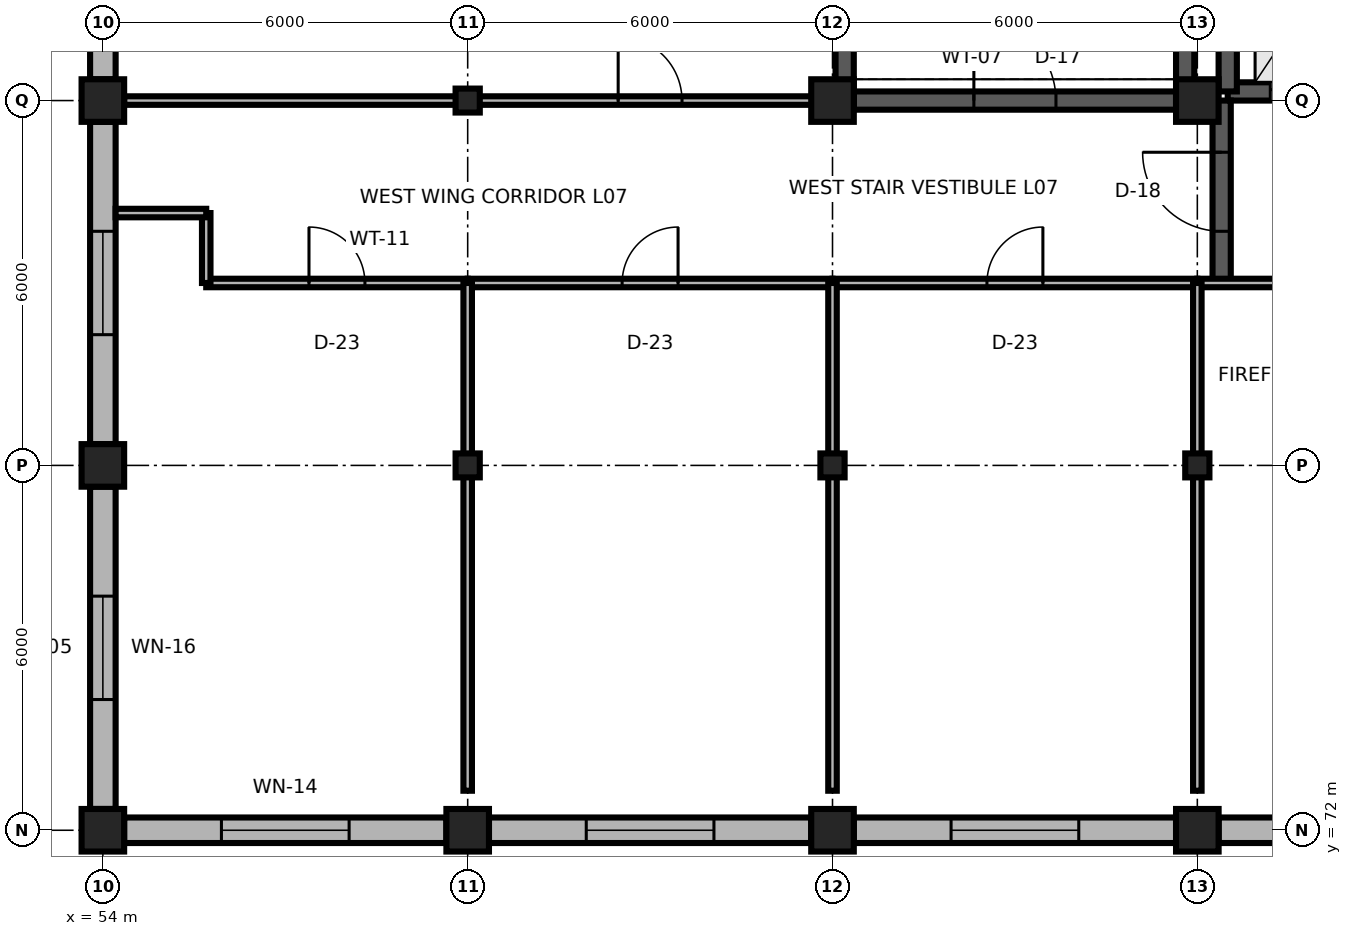
"""IFC4 building model, lengths in metres.
Left out: names, types, materials, properties, quantities, classifications, styles, units other than length and angle.
Written with IfcOpenShell. Run it as: python <this file> out.ifc"""

import sys

from ifc_helpers import new_model, si_unit, direction, frame, frame_2d, origin, origin_2d, place, context, subcontext, project, spatial, rectangle, i_section, extrude, element, fill, save


model = new_model("IFC4")
c1 = context("Model", 3, precision=1e-05, world=origin(), true_north=direction((0.0, 1.0)))
c2 = subcontext(c1, "Body", "Model", "MODEL_VIEW")
j1 = project(units=[si_unit("LENGTHUNIT", "METRE"), si_unit("PLANEANGLEUNIT", "RADIAN")], contexts=[c1])
p1 = place(None, origin())
s1 = spatial("IfcSite", under=j1, at=p1, CompositionType="ELEMENT")
p2 = place(p1, origin())
s2 = spatial("IfcBuilding", under=s1, at=p2, CompositionType="ELEMENT")
p3 = place(p2, frame((0.0, 0.0, 28.8)))
s3 = spatial("IfcBuildingStorey", under=s2, at=p3, CompositionType="ELEMENT", Elevation=28.8)
for number, where, z_axis, x_axis in (
    (1, (54.0, 72.0, 0.0), (0.0, 0.0, 1.0), (1.0, 0.0, 0.0)),
    (2, (60.0, 72.0, 0.0), (0.0, 0.0, 1.0), (1.0, 0.0, 0.0)),
    (3, (66.0, 72.0, 0.0), (0.0, 0.0, 1.0), (1.0, 0.0, 0.0)),
    (4, (72.0, 72.0, 0.0), (0.0, 0.0, 1.0), (1.0, 0.0, 0.0)),
    (5, (54.0, 78.0, 0.0), (0.0, 0.0, 1.0), (1.0, 0.0, 0.0)),
):
    element("IfcColumn", number, at=place(p3, frame(where, z_axis=z_axis, x_axis=x_axis)), inside=s3, PredefinedType="COLUMN", context=c2, shape_type="SweptSolid", body=[
        extrude(rectangle(XDim=0.7, YDim=0.7, at=origin_2d()), origin(), (0.0, 0.0, 1.0), 3.9),
    ])
for number, where, z_axis, x_axis in (
    (6, (60.0, 78.0, 0.0), (0.0, 0.0, 1.0), (1.0, 0.0, 0.0)),
    (7, (66.0, 78.0, 0.0), (0.0, 0.0, 1.0), (1.0, 0.0, 0.0)),
    (8, (72.0, 78.0, 0.0), (0.0, 0.0, 1.0), (1.0, 0.0, 0.0)),
):
    element("IfcColumn", number, at=place(p3, frame(where, z_axis=z_axis, x_axis=x_axis)), inside=s3, PredefinedType="COLUMN", context=c2, shape_type="SweptSolid", body=[
        extrude(i_section(OverallWidth=0.398, OverallDepth=0.394, WebThickness=0.011, FlangeThickness=0.018, FilletRadius=0.022, at=origin_2d()), origin(), (0.0, 0.0, 1.0), 3.9),
    ])
p4 = place(p3, frame((54.0, 84.0, 0.0), z_axis=(0.0, 0.0, 1.0), x_axis=(1.0, 0.0, 0.0)))
e9 = element("IfcColumn", 9, at=p4, inside=s3, PredefinedType="COLUMN", context=c2, shape_type="SweptSolid", body=[
    extrude(rectangle(XDim=0.7, YDim=0.7, at=origin_2d()), origin(), (0.0, 0.0, 1.0), 3.9),
])
p5 = place(p3, frame((60.0, 84.0, 0.0), z_axis=(0.0, 0.0, 1.0), x_axis=(1.0, 0.0, 0.0)))
e10 = element("IfcColumn", 10, at=p5, inside=s3, PredefinedType="COLUMN", context=c2, shape_type="SweptSolid", body=[
    extrude(i_section(OverallWidth=0.398, OverallDepth=0.394, WebThickness=0.011, FlangeThickness=0.018, FilletRadius=0.022, at=origin_2d()), origin(), (0.0, 0.0, 1.0), 3.9),
])
for number, where, z_axis, x_axis in (
    (11, (66.0, 84.0, 0.0), (0.0, 0.0, 1.0), (1.0, 0.0, 0.0)),
    (12, (72.0, 84.0, 0.0), (0.0, 0.0, 1.0), (1.0, 0.0, 0.0)),
):
    element("IfcColumn", number, at=place(p3, frame(where, z_axis=z_axis, x_axis=x_axis)), inside=s3, PredefinedType="COLUMN", context=c2, shape_type="SweptSolid", body=[
        extrude(rectangle(XDim=0.7, YDim=0.7, at=origin_2d()), origin(), (0.0, 0.0, 1.0), 3.9),
    ])
p6 = place(p3, frame((54.35, 72.0, 0.0), z_axis=(0.0, 0.0, 1.0), x_axis=(1.0, 0.0, 0.0)))
e13 = element("IfcWall", 13, at=p6, inside=s3, PredefinedType="SOLIDWALL", context=c2, shape_type="SweptSolid", body=[
    extrude(rectangle(XDim=5.3, YDim=0.42, at=frame_2d((2.65, 0.0))), origin(), (0.0, 0.0, 1.0), 3.32),
])
p7 = place(p6, frame((1.6, 0.0, 0.85)))
e14 = element("IfcOpeningElement", 14, at=p7, cuts=e13, PredefinedType="OPENING", context=c2, shape_type="SweptSolid", body=[
    extrude(rectangle(XDim=2.1, YDim=2.1, at=frame_2d((1.05, 1.05))), frame((0.0, 0.225, 0.0), z_axis=(0.0, -1.0, 0.0), x_axis=(1.0, 0.0, 0.0)), (0.0, 0.0, 1.0), 0.45),
])
p8 = place(p3, frame((60.35, 72.0, 0.0), z_axis=(0.0, 0.0, 1.0), x_axis=(1.0, 0.0, 0.0)))
e15 = element("IfcWall", 15, at=p8, inside=s3, PredefinedType="SOLIDWALL", context=c2, shape_type="SweptSolid", body=[
    extrude(rectangle(XDim=5.3, YDim=0.42, at=frame_2d((2.65, 0.0))), origin(), (0.0, 0.0, 1.0), 3.32),
])
p9 = place(p8, frame((1.6, 0.0, 0.85)))
e16 = element("IfcOpeningElement", 16, at=p9, cuts=e15, PredefinedType="OPENING", context=c2, shape_type="SweptSolid", body=[
    extrude(rectangle(XDim=2.1, YDim=2.1, at=frame_2d((1.05, 1.05))), frame((0.0, 0.225, 0.0), z_axis=(0.0, -1.0, 0.0), x_axis=(1.0, 0.0, 0.0)), (0.0, 0.0, 1.0), 0.45),
])
p10 = place(p3, frame((66.35, 72.0, 0.0), z_axis=(0.0, 0.0, 1.0), x_axis=(1.0, 0.0, 0.0)))
e17 = element("IfcWall", 17, at=p10, inside=s3, PredefinedType="SOLIDWALL", context=c2, shape_type="SweptSolid", body=[
    extrude(rectangle(XDim=5.3, YDim=0.42, at=frame_2d((2.65, 0.0))), origin(), (0.0, 0.0, 1.0), 3.32),
])
p11 = place(p10, frame((1.6, 0.0, 0.85)))
e18 = element("IfcOpeningElement", 18, at=p11, cuts=e17, PredefinedType="OPENING", context=c2, shape_type="SweptSolid", body=[
    extrude(rectangle(XDim=2.1, YDim=2.1, at=frame_2d((1.05, 1.05))), frame((0.0, 0.225, 0.0), z_axis=(0.0, -1.0, 0.0), x_axis=(1.0, 0.0, 0.0)), (0.0, 0.0, 1.0), 0.45),
])
p12 = place(p3, frame((72.35, 72.0, 0.0), z_axis=(0.0, 0.0, 1.0), x_axis=(1.0, 0.0, 0.0)))
e19 = element("IfcWall", 19, at=p12, inside=s3, PredefinedType="SOLIDWALL", context=c2, shape_type="SweptSolid", body=[
    extrude(rectangle(XDim=5.3, YDim=0.42, at=frame_2d((2.65, 0.0))), origin(), (0.0, 0.0, 1.0), 3.32),
])
p13 = place(p12, frame((1.6, 0.0, 0.85)))
e20 = element("IfcOpeningElement", 20, at=p13, cuts=e19, PredefinedType="OPENING", context=c2, shape_type="SweptSolid", body=[
    extrude(rectangle(XDim=2.1, YDim=2.1, at=frame_2d((1.05, 1.05))), frame((0.0, 0.225, 0.0), z_axis=(0.0, -1.0, 0.0), x_axis=(1.0, 0.0, 0.0)), (0.0, 0.0, 1.0), 0.45),
])
p14 = place(p3, frame((54.0, 72.35, 0.0), z_axis=(0.0, 0.0, 1.0), x_axis=(0.0, 1.0, 0.0)))
e21 = element("IfcWall", 21, at=p14, inside=s3, PredefinedType="SOLIDWALL", context=c2, shape_type="SweptSolid", body=[
    extrude(rectangle(XDim=5.3, YDim=0.42, at=frame_2d((2.65, 0.0))), origin(), (0.0, 0.0, 1.0), 3.32),
])
p15 = place(p14, frame((1.8, 0.0, 0.85)))
e22 = element("IfcOpeningElement", 22, at=p15, cuts=e21, PredefinedType="OPENING", context=c2, shape_type="SweptSolid", body=[
    extrude(rectangle(XDim=1.7, YDim=2.05, at=frame_2d((0.85, 1.025))), frame((0.0, 0.225, 0.0), z_axis=(0.0, -1.0, 0.0), x_axis=(1.0, 0.0, 0.0)), (0.0, 0.0, 1.0), 0.45),
])
p16 = place(p3, frame((54.0, 78.35, 0.0), z_axis=(0.0, 0.0, 1.0), x_axis=(0.0, 1.0, 0.0)))
e23 = element("IfcWall", 23, at=p16, inside=s3, PredefinedType="SOLIDWALL", context=c2, shape_type="SweptSolid", body=[
    extrude(rectangle(XDim=5.3, YDim=0.42, at=frame_2d((2.65, 0.0))), origin(), (0.0, 0.0, 1.0), 3.32),
])
p17 = place(p16, frame((1.8, 0.0, 0.85)))
e24 = element("IfcOpeningElement", 24, at=p17, cuts=e23, PredefinedType="OPENING", context=c2, shape_type="SweptSolid", body=[
    extrude(rectangle(XDim=1.7, YDim=2.05, at=frame_2d((0.85, 1.025))), frame((0.0, 0.225, 0.0), z_axis=(0.0, -1.0, 0.0), x_axis=(1.0, 0.0, 0.0)), (0.0, 0.0, 1.0), 0.45),
])
p18 = place(p3, frame((54.0, 84.35, 0.0), z_axis=(0.0, 0.0, 1.0), x_axis=(0.0, 1.0, 0.0)))
e25 = element("IfcWall", 25, at=p18, inside=s3, PredefinedType="SOLIDWALL", context=c2, shape_type="SweptSolid", body=[
    extrude(rectangle(XDim=5.3, YDim=0.42, at=frame_2d((2.65, 0.0))), origin(), (0.0, 0.0, 1.0), 3.32),
])
p19 = place(p18, frame((1.8, 0.0, 0.85)))
e26 = element("IfcOpeningElement", 26, at=p19, cuts=e25, PredefinedType="OPENING", context=c2, shape_type="SweptSolid", body=[
    extrude(rectangle(XDim=1.7, YDim=2.05, at=frame_2d((0.85, 1.025))), frame((0.0, 0.225, 0.0), z_axis=(0.0, -1.0, 0.0), x_axis=(1.0, 0.0, 0.0)), (0.0, 0.0, 1.0), 0.45),
])
p20 = place(p3, frame((66.35, 84.0, 0.0), z_axis=(0.0, 0.0, 1.0), x_axis=(1.0, 0.0, 0.0)))
e27 = element("IfcWall", 27, at=p20, inside=s3, PredefinedType="SHEAR", context=c2, shape_type="SweptSolid", body=[
    extrude(rectangle(XDim=5.3, YDim=0.3, at=frame_2d((2.65, 0.0))), origin(), (0.0, 0.0, 1.0), 3.66),
])
p21 = place(p20, frame((1.975, 0.0, 0.0)))
e28 = element("IfcOpeningElement", 28, at=p21, cuts=e27, PredefinedType="OPENING", context=c2, shape_type="SweptSolid", body=[
    extrude(rectangle(XDim=1.35, YDim=2.2, at=frame_2d((0.675, 1.1))), frame((0.0, 0.165, 0.0), z_axis=(0.0, -1.0, 0.0), x_axis=(1.0, 0.0, 0.0)), (0.0, 0.0, 1.0), 0.33),
])
for number, where, z_axis, x_axis in (
    (29, (66.2, 84.0, 0.0), (0.0, 0.0, 1.0), (0.0, 1.0, 0.0)),
    (30, (71.8, 84.0, 0.0), (0.0, 0.0, 1.0), (0.0, 1.0, 0.0)),
):
    element("IfcWall", number, at=place(p3, frame(where, z_axis=z_axis, x_axis=x_axis)), inside=s3, PredefinedType="SHEAR", context=c2, shape_type="SweptSolid", body=[
        extrude(rectangle(XDim=11.8, YDim=0.3, at=frame_2d((5.9, 0.0))), origin(), (0.0, 0.0, 1.0), 3.74),
    ])
p22 = place(p3, frame((72.5, 84.15, 0.0), z_axis=(0.0, 0.0, 1.0), x_axis=(1.0, 0.0, 0.0)))
e31 = element("IfcWall", 31, at=p22, inside=s3, PredefinedType="SHEAR", context=c2, shape_type="SweptSolid", body=[
    extrude(rectangle(XDim=2.5, YDim=0.3, at=frame_2d((1.25, 0.0))), origin(), (0.0, 0.0, 1.0), 3.74),
])
p23 = place(p22, frame((0.7, 0.0, 0.0)))
e32 = element("IfcOpeningElement", 32, at=p23, cuts=e31, PredefinedType="OPENING", context=c2, shape_type="SweptSolid", body=[
    extrude(rectangle(XDim=1.1, YDim=2.1, at=frame_2d((0.55, 1.05))), frame((0.0, 0.165, 0.0), z_axis=(0.0, -1.0, 0.0), x_axis=(1.0, 0.0, 0.0)), (0.0, 0.0, 1.0), 0.33),
])
p24 = place(p3, frame((72.5, 84.15, 0.0), z_axis=(0.0, 0.0, 1.0), x_axis=(0.0, 1.0, 0.0)))
e33 = element("IfcWall", 33, at=p24, inside=s3, PredefinedType="SHEAR", context=c2, shape_type="SweptSolid", body=[
    extrude(rectangle(XDim=3.4, YDim=0.3, at=frame_2d((1.7, 0.0))), origin(), (0.0, 0.0, 1.0), 3.74),
])
p25 = place(p3, frame((72.4, 81.0, 0.0), z_axis=(0.0, 0.0, 1.0), x_axis=(0.0, 1.0, 0.0)))
e34 = element("IfcWall", 34, at=p25, inside=s3, PredefinedType="SHEAR", context=c2, shape_type="SweptSolid", body=[
    extrude(rectangle(XDim=3.0, YDim=0.3, at=frame_2d((1.5, 0.0))), origin(), (0.0, 0.0, 1.0), 3.74),
])
p26 = place(p25, frame((0.85, 0.0, 0.0)))
e35 = element("IfcOpeningElement", 35, at=p26, cuts=e34, PredefinedType="OPENING", context=c2, shape_type="SweptSolid", body=[
    extrude(rectangle(XDim=1.3, YDim=2.2, at=frame_2d((0.65, 1.1))), frame((0.0, 0.165, 0.0), z_axis=(0.0, -1.0, 0.0), x_axis=(1.0, 0.0, 0.0)), (0.0, 0.0, 1.0), 0.33),
])
p27 = place(p3, frame((55.7, 81.0, 0.0), z_axis=(0.0, 0.0, 1.0), x_axis=(1.0, 0.0, 0.0)))
e36 = element("IfcWall", 36, at=p27, inside=s3, PredefinedType="PARTITIONING", context=c2, shape_type="SweptSolid", body=[
    extrude(rectangle(XDim=4.3, YDim=0.14, at=frame_2d((2.15, 0.0))), origin(), (0.0, 0.0, 1.0), 3.74),
])
p28 = place(p27, frame((1.69, 0.0, 0.0)))
e37 = element("IfcOpeningElement", 37, at=p28, cuts=e36, PredefinedType="OPENING", context=c2, shape_type="SweptSolid", body=[
    extrude(rectangle(XDim=0.92, YDim=2.15, at=frame_2d((0.46, 1.075))), frame((0.0, 0.085, 0.0), z_axis=(0.0, -1.0, 0.0), x_axis=(1.0, 0.0, 0.0)), (0.0, 0.0, 1.0), 0.17),
])
p29 = place(p3, frame((60.0, 81.0, 0.0), z_axis=(0.0, 0.0, 1.0), x_axis=(1.0, 0.0, 0.0)))
e38 = element("IfcWall", 38, at=p29, inside=s3, PredefinedType="PARTITIONING", context=c2, shape_type="SweptSolid", body=[
    extrude(rectangle(XDim=6.0, YDim=0.14, at=frame_2d((3.0, 0.0))), origin(), (0.0, 0.0, 1.0), 3.74),
])
p30 = place(p29, frame((2.54, 0.0, 0.0)))
e39 = element("IfcOpeningElement", 39, at=p30, cuts=e38, PredefinedType="OPENING", context=c2, shape_type="SweptSolid", body=[
    extrude(rectangle(XDim=0.92, YDim=2.15, at=frame_2d((0.46, 1.075))), frame((0.0, 0.085, 0.0), z_axis=(0.0, -1.0, 0.0), x_axis=(1.0, 0.0, 0.0)), (0.0, 0.0, 1.0), 0.17),
])
p31 = place(p3, frame((66.0, 81.0, 0.0), z_axis=(0.0, 0.0, 1.0), x_axis=(1.0, 0.0, 0.0)))
e40 = element("IfcWall", 40, at=p31, inside=s3, PredefinedType="PARTITIONING", context=c2, shape_type="SweptSolid", body=[
    extrude(rectangle(XDim=6.0, YDim=0.14, at=frame_2d((3.0, 0.0))), origin(), (0.0, 0.0, 1.0), 3.74),
])
p32 = place(p31, frame((2.54, 0.0, 0.0)))
e41 = element("IfcOpeningElement", 41, at=p32, cuts=e40, PredefinedType="OPENING", context=c2, shape_type="SweptSolid", body=[
    extrude(rectangle(XDim=0.92, YDim=2.15, at=frame_2d((0.46, 1.075))), frame((0.0, 0.085, 0.0), z_axis=(0.0, -1.0, 0.0), x_axis=(1.0, 0.0, 0.0)), (0.0, 0.0, 1.0), 0.17),
])
p33 = place(p3, frame((72.0, 81.0, 0.0), z_axis=(0.0, 0.0, 1.0), x_axis=(1.0, 0.0, 0.0)))
e42 = element("IfcWall", 42, at=p33, inside=s3, PredefinedType="PARTITIONING", context=c2, shape_type="SweptSolid", body=[
    extrude(rectangle(XDim=6.0, YDim=0.14, at=frame_2d((3.0, 0.0))), origin(), (0.0, 0.0, 1.0), 3.74),
])
p34 = place(p33, frame((2.54, 0.0, 0.0)))
e43 = element("IfcOpeningElement", 43, at=p34, cuts=e42, PredefinedType="OPENING", context=c2, shape_type="SweptSolid", body=[
    extrude(rectangle(XDim=0.92, YDim=2.15, at=frame_2d((0.46, 1.075))), frame((0.0, 0.085, 0.0), z_axis=(0.0, -1.0, 0.0), x_axis=(1.0, 0.0, 0.0)), (0.0, 0.0, 1.0), 0.17),
])
p35 = place(p3, frame((60.0, 84.0, 0.0), z_axis=(0.0, 0.0, 1.0), x_axis=(1.0, 0.0, 0.0)))
e44 = element("IfcWall", 44, at=p35, inside=s3, PredefinedType="PARTITIONING", context=c2, shape_type="SweptSolid", body=[
    extrude(rectangle(XDim=6.0, YDim=0.14, at=frame_2d((3.0, 0.0))), origin(), (0.0, 0.0, 1.0), 3.352),
])
p36 = place(p35, frame((2.475, 0.0, 0.0)))
e45 = element("IfcOpeningElement", 45, at=p36, cuts=e44, PredefinedType="OPENING", context=c2, shape_type="SweptSolid", body=[
    extrude(rectangle(XDim=1.05, YDim=2.25, at=frame_2d((0.525, 1.125))), frame((0.0, 0.085, 0.0), z_axis=(0.0, -1.0, 0.0), x_axis=(1.0, 0.0, 0.0)), (0.0, 0.0, 1.0), 0.17),
])
for number, where, z_axis, x_axis in (
    (46, (60.0, 72.65, 0.0), (0.0, 0.0, 1.0), (0.0, 1.0, 0.0)),
    (47, (66.0, 72.65, 0.0), (0.0, 0.0, 1.0), (0.0, 1.0, 0.0)),
    (48, (72.0, 72.65, 0.0), (0.0, 0.0, 1.0), (0.0, 1.0, 0.0)),
):
    element("IfcWall", number, at=place(p3, frame(where, z_axis=z_axis, x_axis=x_axis)), inside=s3, PredefinedType="PARTITIONING", context=c2, shape_type="SweptSolid", body=[
        extrude(rectangle(XDim=8.35, YDim=0.14, at=frame_2d((4.175, 0.0))), origin(), (0.0, 0.0, 1.0), 3.352),
    ])
p37 = place(p3, frame((55.7, 81.0, 0.0), z_axis=(0.0, 0.0, 1.0), x_axis=(0.0, 1.0, 0.0)))
e49 = element("IfcWall", 49, at=p37, inside=s3, PredefinedType="PARTITIONING", context=c2, shape_type="SweptSolid", body=[
    extrude(rectangle(XDim=1.15, YDim=0.14, at=frame_2d((0.575, 0.0))), origin(), (0.0, 0.0, 1.0), 3.74),
])
p38 = place(p3, frame((55.7, 82.15, 0.0), z_axis=(0.0, 0.0, 1.0), x_axis=(-1.0, 0.0, 0.0)))
e50 = element("IfcWall", 50, at=p38, inside=s3, PredefinedType="PARTITIONING", context=c2, shape_type="SweptSolid", body=[
    extrude(rectangle(XDim=1.49, YDim=0.14, at=frame_2d((0.745, 0.0))), origin(), (0.0, 0.0, 1.0), 3.74),
])
p39 = place(p3, frame((54.35, 84.0, 0.0), z_axis=(0.0, 0.0, 1.0), x_axis=(1.0, 0.0, 0.0)))
e51 = element("IfcWall", 51, at=p39, inside=s3, PredefinedType="PARTITIONING", context=c2, shape_type="SweptSolid", body=[
    extrude(rectangle(XDim=5.65, YDim=0.14, at=frame_2d((2.825, 0.0))), origin(), (0.0, 0.0, 1.0), 3.352),
])
p40 = place(p7, origin())
e52 = element("IfcWindow", 52, at=p40, inside=s3, PartitioningType="SINGLE_PANEL", PredefinedType="WINDOW", context=c2, shape_type="SweptSolid", body=[
    extrude(rectangle(XDim=2.1, YDim=2.1, at=frame_2d((1.05, 1.05))), frame((0.0, 0.03, 0.0), z_axis=(0.0, -1.0, 0.0), x_axis=(1.0, 0.0, 0.0)), (0.0, 0.0, 1.0), 0.06),
])
fill(e14, e52)
p41 = place(p9, origin())
e53 = element("IfcWindow", 53, at=p41, inside=s3, PartitioningType="SINGLE_PANEL", PredefinedType="WINDOW", context=c2, shape_type="SweptSolid", body=[
    extrude(rectangle(XDim=2.1, YDim=2.1, at=frame_2d((1.05, 1.05))), frame((0.0, 0.03, 0.0), z_axis=(0.0, -1.0, 0.0), x_axis=(1.0, 0.0, 0.0)), (0.0, 0.0, 1.0), 0.06),
])
fill(e16, e53)
p42 = place(p11, origin())
e54 = element("IfcWindow", 54, at=p42, inside=s3, PartitioningType="SINGLE_PANEL", PredefinedType="WINDOW", context=c2, shape_type="SweptSolid", body=[
    extrude(rectangle(XDim=2.1, YDim=2.1, at=frame_2d((1.05, 1.05))), frame((0.0, 0.03, 0.0), z_axis=(0.0, -1.0, 0.0), x_axis=(1.0, 0.0, 0.0)), (0.0, 0.0, 1.0), 0.06),
])
fill(e18, e54)
p43 = place(p15, origin())
e55 = element("IfcWindow", 55, at=p43, inside=s3, PartitioningType="SINGLE_PANEL", PredefinedType="WINDOW", context=c2, shape_type="SweptSolid", body=[
    extrude(rectangle(XDim=1.7, YDim=2.05, at=frame_2d((0.85, 1.025))), frame((0.0, 0.03, 0.0), z_axis=(0.0, -1.0, 0.0), x_axis=(1.0, 0.0, 0.0)), (0.0, 0.0, 1.0), 0.06),
])
fill(e22, e55)
p44 = place(p17, origin())
e56 = element("IfcWindow", 56, at=p44, inside=s3, PartitioningType="SINGLE_PANEL", PredefinedType="WINDOW", context=c2, shape_type="SweptSolid", body=[
    extrude(rectangle(XDim=1.7, YDim=2.05, at=frame_2d((0.85, 1.025))), frame((0.0, 0.03, 0.0), z_axis=(0.0, -1.0, 0.0), x_axis=(1.0, 0.0, 0.0)), (0.0, 0.0, 1.0), 0.06),
])
fill(e24, e56)
p45 = place(p21, origin())
e57 = element("IfcDoor", 57, at=p45, inside=s3, OperationType="SINGLE_SWING_LEFT", PredefinedType="DOOR", context=c2, shape_type="SweptSolid", body=[
    extrude(rectangle(XDim=1.35, YDim=2.2, at=frame_2d((0.675, 1.1))), frame((0.0, 0.025, 0.0), z_axis=(0.0, -1.0, 0.0), x_axis=(1.0, 0.0, 0.0)), (0.0, 0.0, 1.0), 0.05),
])
fill(e28, e57)
p46 = place(p23, origin())
e58 = element("IfcDoor", 58, at=p46, inside=s3, OperationType="DOUBLE_DOOR_SLIDING", PredefinedType="DOOR", context=c2, shape_type="SweptSolid", body=[
    extrude(rectangle(XDim=1.1, YDim=2.1, at=frame_2d((0.55, 1.05))), frame((0.0, 0.025, 0.0), z_axis=(0.0, -1.0, 0.0), x_axis=(1.0, 0.0, 0.0)), (0.0, 0.0, 1.0), 0.05),
])
fill(e32, e58)
p47 = place(p26, origin())
e59 = element("IfcDoor", 59, at=p47, inside=s3, OperationType="SINGLE_SWING_RIGHT", PredefinedType="DOOR", context=c2, shape_type="SweptSolid", body=[
    extrude(rectangle(XDim=1.3, YDim=2.2, at=frame_2d((0.65, 1.1))), frame((0.0, 0.025, 0.0), z_axis=(0.0, -1.0, 0.0), x_axis=(1.0, 0.0, 0.0)), (0.0, 0.0, 1.0), 0.05),
])
fill(e35, e59)
p48 = place(p28, origin())
e60 = element("IfcDoor", 60, at=p48, inside=s3, OperationType="SINGLE_SWING_LEFT", PredefinedType="DOOR", context=c2, shape_type="SweptSolid", body=[
    extrude(rectangle(XDim=0.92, YDim=2.15, at=frame_2d((0.46, 1.075))), frame((0.0, 0.025, 0.0), z_axis=(0.0, -1.0, 0.0), x_axis=(1.0, 0.0, 0.0)), (0.0, 0.0, 1.0), 0.05),
])
fill(e37, e60)
p49 = place(p30, origin())
e61 = element("IfcDoor", 61, at=p49, inside=s3, OperationType="SINGLE_SWING_RIGHT", PredefinedType="DOOR", context=c2, shape_type="SweptSolid", body=[
    extrude(rectangle(XDim=0.92, YDim=2.15, at=frame_2d((0.46, 1.075))), frame((0.0, 0.025, 0.0), z_axis=(0.0, -1.0, 0.0), x_axis=(1.0, 0.0, 0.0)), (0.0, 0.0, 1.0), 0.05),
])
fill(e39, e61)
p50 = place(p32, origin())
e62 = element("IfcDoor", 62, at=p50, inside=s3, OperationType="SINGLE_SWING_RIGHT", PredefinedType="DOOR", context=c2, shape_type="SweptSolid", body=[
    extrude(rectangle(XDim=0.92, YDim=2.15, at=frame_2d((0.46, 1.075))), frame((0.0, 0.025, 0.0), z_axis=(0.0, -1.0, 0.0), x_axis=(1.0, 0.0, 0.0)), (0.0, 0.0, 1.0), 0.05),
])
fill(e41, e62)
p51 = place(p36, origin())
e63 = element("IfcDoor", 63, at=p51, inside=s3, OperationType="SINGLE_SWING_LEFT", PredefinedType="DOOR", context=c2, shape_type="SweptSolid", body=[
    extrude(rectangle(XDim=1.05, YDim=2.25, at=frame_2d((0.525, 1.125))), frame((0.0, 0.025, 0.0), z_axis=(0.0, -1.0, 0.0), x_axis=(1.0, 0.0, 0.0)), (0.0, 0.0, 1.0), 0.05),
])
fill(e45, e63)
save(model, sys.argv[1])
